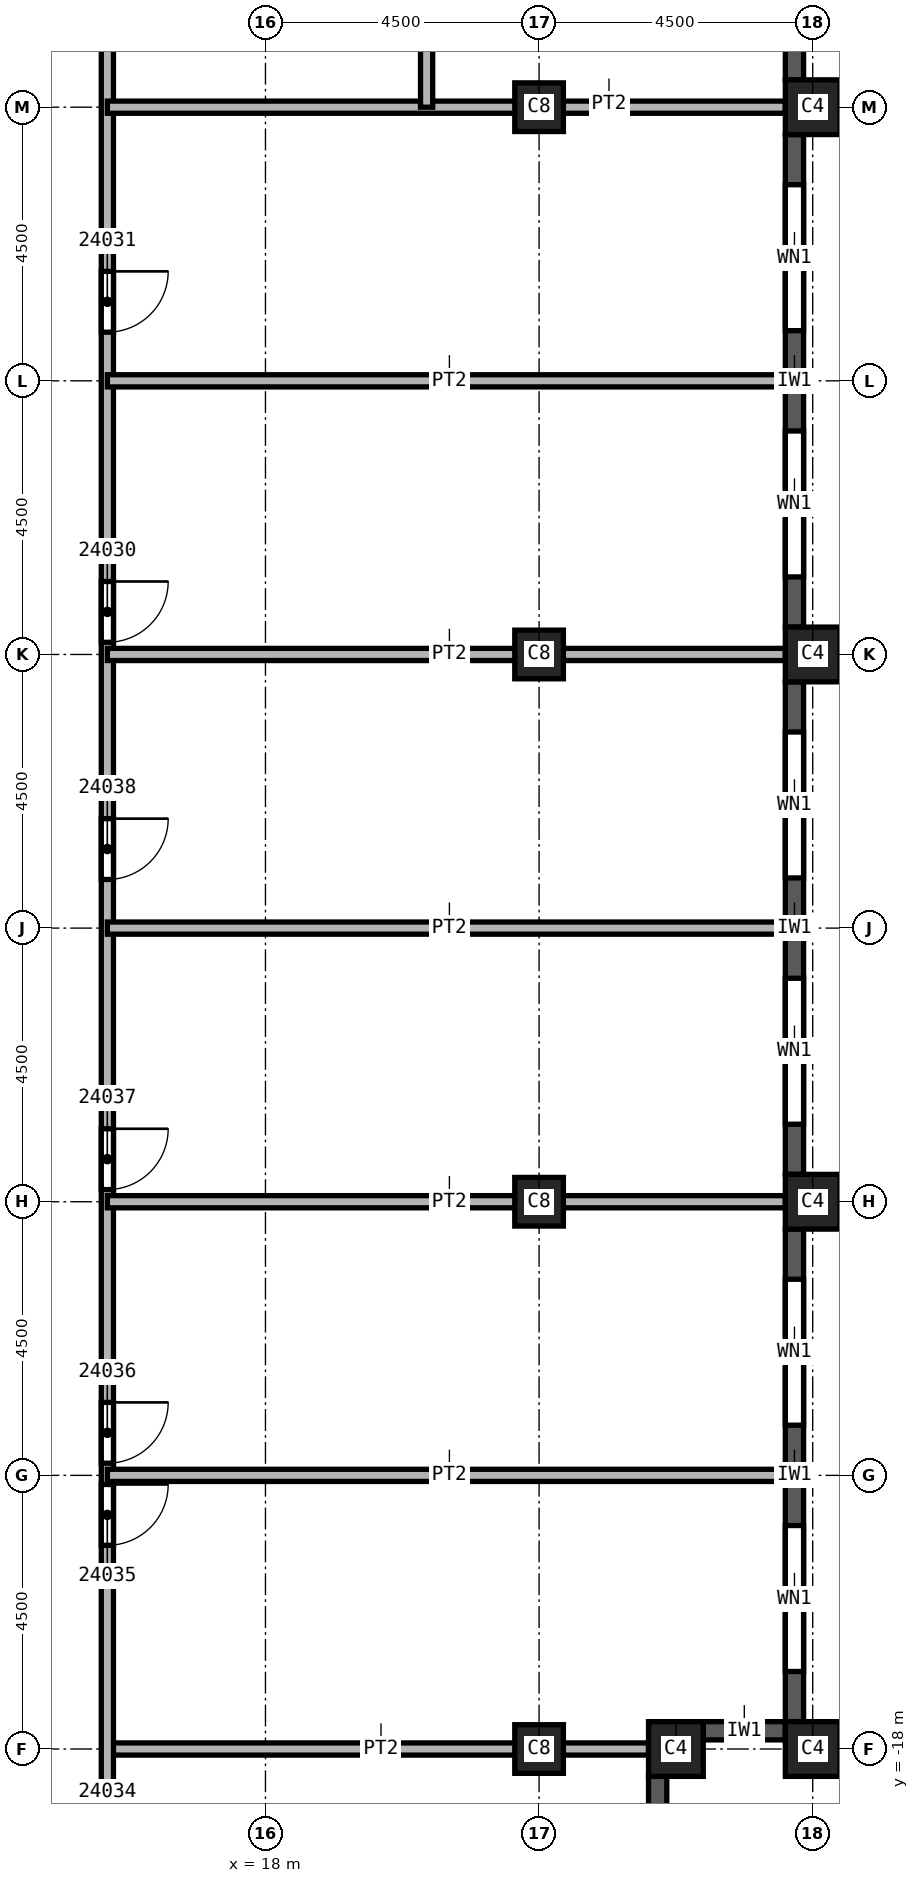
"""IFC4 building model, lengths in metres.
Left out: names, types, materials, properties, quantities, classifications, styles, units other than length and angle.
Written with IfcOpenShell. Run it as: python <this file> out.ifc"""

import sys

from ifc_helpers import new_model, si_unit, direction, frame, frame_2d, origin, origin_2d, place, context, subcontext, project, spatial, rectangle, extrude, element, fill, save


model = new_model("IFC4")
c1 = context("Model", 3, precision=1e-05, world=origin(), true_north=direction((0.0, 1.0)))
c2 = subcontext(c1, "Body", "Model", "MODEL_VIEW")
j1 = project(units=[si_unit("LENGTHUNIT", "METRE"), si_unit("PLANEANGLEUNIT", "RADIAN")], contexts=[c1])
p1 = place(None, origin())
s1 = spatial("IfcSite", under=j1, at=p1, CompositionType="ELEMENT")
p2 = place(p1, origin())
s2 = spatial("IfcBuilding", under=s1, at=p2, CompositionType="ELEMENT")
p3 = place(p2, frame((0.0, 0.0, 338.0)))
s3 = spatial("IfcBuildingStorey", under=s2, at=p3, CompositionType="ELEMENT", Elevation=338.0)
for number, where, z_axis, x_axis in (
    (1, (22.5, 0.0, 0.0), (0.0, 0.0, 1.0), (1.0, 0.0, 0.0)),
    (2, (22.5, 9.0, 0.0), (0.0, 0.0, 1.0), (1.0, 0.0, 0.0)),
    (3, (22.5, -9.0, 0.0), (0.0, 0.0, 1.0), (1.0, 0.0, 0.0)),
    (4, (22.5, -18.0, 0.0), (0.0, 0.0, 1.0), (1.0, 0.0, 0.0)),
):
    element("IfcColumn", number, at=place(p3, frame(where, z_axis=z_axis, x_axis=x_axis)), inside=s3, PredefinedType="COLUMN", context=c2, shape_type="SweptSolid", body=[
        extrude(rectangle(XDim=0.8, YDim=0.8, at=origin_2d()), origin(), (0.0, 0.0, 1.0), 3.74),
    ])
for number, where, z_axis, x_axis in (
    (5, (27.0, 0.0, 0.0), (0.0, 0.0, 1.0), (0.0, 1.0, 0.0)),
    (6, (27.0, 9.0, 0.0), (0.0, 0.0, 1.0), (0.0, 1.0, 0.0)),
    (7, (27.0, -9.0, 0.0), (0.0, 0.0, 1.0), (0.0, 1.0, 0.0)),
    (8, (27.0, -18.0, 0.0), (0.0, 0.0, 1.0), (0.0, 1.0, 0.0)),
    (9, (24.75, -18.0, 0.0), (0.0, 0.0, 1.0), (1.0, 0.0, 0.0)),
):
    element("IfcColumn", number, at=place(p3, frame(where, z_axis=z_axis, x_axis=x_axis)), inside=s3, PredefinedType="COLUMN", context=c2, shape_type="SweptSolid", body=[
        extrude(rectangle(XDim=0.9, YDim=0.9, at=origin_2d()), origin(), (0.0, 0.0, 1.0), 3.74),
    ])
p4 = place(p3, frame((24.45, -21.25, 0.0), z_axis=(0.0, 0.0, 1.0), x_axis=(0.0, 1.0, 0.0)))
e10 = element("IfcWall", 10, at=p4, inside=s3, PredefinedType="SOLIDWALL", context=c2, shape_type="SweptSolid", body=[
    extrude(rectangle(XDim=2.8, YDim=0.3, at=frame_2d((1.4, 0.0))), origin(), (0.0, 0.0, 1.0), 3.14),
])
p5 = place(p3, frame((25.2, -17.7, 0.0), z_axis=(0.0, 0.0, 1.0), x_axis=(1.0, 0.0, 0.0)))
e11 = element("IfcWall", 11, at=p5, inside=s3, PredefinedType="SOLIDWALL", context=c2, shape_type="SweptSolid", body=[
    extrude(rectangle(XDim=1.35, YDim=0.3, at=frame_2d((0.675, 0.0))), origin(), (0.0, 0.0, 1.0), 3.14),
])
p6 = place(p3, frame((26.7, -17.55, 0.0), z_axis=(0.0, 0.0, 1.0), x_axis=(0.0, 1.0, 0.0)))
e12 = element("IfcWall", 12, at=p6, inside=s3, PredefinedType="SOLIDWALL", context=c2, shape_type="SweptSolid", body=[
    extrude(rectangle(XDim=8.1, YDim=0.3, at=frame_2d((4.05, 0.0))), origin(), (0.0, 0.0, 1.0), 3.14),
])
p7 = place(p6, frame((0.825, 0.0, 0.8)))
e13 = element("IfcOpeningElement", 13, at=p7, cuts=e12, PredefinedType="OPENING", context=c2, shape_type="SweptSolid", body=[
    extrude(rectangle(XDim=2.4, YDim=1.95, at=frame_2d((1.2, 0.975))), frame((0.0, 0.15, 0.0), z_axis=(0.0, -1.0, 0.0), x_axis=(1.0, 0.0, 0.0)), (0.0, 0.0, 1.0), 0.3),
])
p8 = place(p6, frame((4.875, 0.0, 0.8)))
e14 = element("IfcOpeningElement", 14, at=p8, cuts=e12, PredefinedType="OPENING", context=c2, shape_type="SweptSolid", body=[
    extrude(rectangle(XDim=2.4, YDim=1.95, at=frame_2d((1.2, 0.975))), frame((0.0, 0.15, 0.0), z_axis=(0.0, -1.0, 0.0), x_axis=(1.0, 0.0, 0.0)), (0.0, 0.0, 1.0), 0.3),
])
p9 = place(p3, frame((26.7, -8.55, 0.0), z_axis=(0.0, 0.0, 1.0), x_axis=(0.0, 1.0, 0.0)))
e15 = element("IfcWall", 15, at=p9, inside=s3, PredefinedType="SOLIDWALL", context=c2, shape_type="SweptSolid", body=[
    extrude(rectangle(XDim=8.1, YDim=0.3, at=frame_2d((4.05, 0.0))), origin(), (0.0, 0.0, 1.0), 3.14),
])
p10 = place(p9, frame((0.825, 0.0, 0.8)))
e16 = element("IfcOpeningElement", 16, at=p10, cuts=e15, PredefinedType="OPENING", context=c2, shape_type="SweptSolid", body=[
    extrude(rectangle(XDim=2.4, YDim=1.95, at=frame_2d((1.2, 0.975))), frame((0.0, 0.15, 0.0), z_axis=(0.0, -1.0, 0.0), x_axis=(1.0, 0.0, 0.0)), (0.0, 0.0, 1.0), 0.3),
])
p11 = place(p9, frame((4.875, 0.0, 0.8)))
e17 = element("IfcOpeningElement", 17, at=p11, cuts=e15, PredefinedType="OPENING", context=c2, shape_type="SweptSolid", body=[
    extrude(rectangle(XDim=2.4, YDim=1.95, at=frame_2d((1.2, 0.975))), frame((0.0, 0.15, 0.0), z_axis=(0.0, -1.0, 0.0), x_axis=(1.0, 0.0, 0.0)), (0.0, 0.0, 1.0), 0.3),
])
p12 = place(p3, frame((26.7, 0.45, 0.0), z_axis=(0.0, 0.0, 1.0), x_axis=(0.0, 1.0, 0.0)))
e18 = element("IfcWall", 18, at=p12, inside=s3, PredefinedType="SOLIDWALL", context=c2, shape_type="SweptSolid", body=[
    extrude(rectangle(XDim=8.1, YDim=0.3, at=frame_2d((4.05, 0.0))), origin(), (0.0, 0.0, 1.0), 3.14),
])
p13 = place(p12, frame((0.825, 0.0, 0.8)))
e19 = element("IfcOpeningElement", 19, at=p13, cuts=e18, PredefinedType="OPENING", context=c2, shape_type="SweptSolid", body=[
    extrude(rectangle(XDim=2.4, YDim=1.95, at=frame_2d((1.2, 0.975))), frame((0.0, 0.15, 0.0), z_axis=(0.0, -1.0, 0.0), x_axis=(1.0, 0.0, 0.0)), (0.0, 0.0, 1.0), 0.3),
])
p14 = place(p12, frame((4.875, 0.0, 0.8)))
e20 = element("IfcOpeningElement", 20, at=p14, cuts=e18, PredefinedType="OPENING", context=c2, shape_type="SweptSolid", body=[
    extrude(rectangle(XDim=2.4, YDim=1.95, at=frame_2d((1.2, 0.975))), frame((0.0, 0.15, 0.0), z_axis=(0.0, -1.0, 0.0), x_axis=(1.0, 0.0, 0.0)), (0.0, 0.0, 1.0), 0.3),
])
p15 = place(p3, frame((26.7, 9.45, 0.0), z_axis=(0.0, 0.0, 1.0), x_axis=(0.0, 1.0, 0.0)))
e21 = element("IfcWall", 21, at=p15, inside=s3, PredefinedType="SOLIDWALL", context=c2, shape_type="SweptSolid", body=[
    extrude(rectangle(XDim=8.1, YDim=0.3, at=frame_2d((4.05, 0.0))), origin(), (0.0, 0.0, 1.0), 3.14),
])
p16 = place(p15, frame((0.825, 0.0, 0.8)))
e22 = element("IfcOpeningElement", 22, at=p16, cuts=e21, PredefinedType="OPENING", context=c2, shape_type="SweptSolid", body=[
    extrude(rectangle(XDim=2.4, YDim=1.95, at=frame_2d((1.2, 0.975))), frame((0.0, 0.15, 0.0), z_axis=(0.0, -1.0, 0.0), x_axis=(1.0, 0.0, 0.0)), (0.0, 0.0, 1.0), 0.3),
])
p17 = place(p15, frame((4.875, 0.0, 0.8)))
e23 = element("IfcOpeningElement", 23, at=p17, cuts=e21, PredefinedType="OPENING", context=c2, shape_type="SweptSolid", body=[
    extrude(rectangle(XDim=2.4, YDim=1.95, at=frame_2d((1.2, 0.975))), frame((0.0, 0.15, 0.0), z_axis=(0.0, -1.0, 0.0), x_axis=(1.0, 0.0, 0.0)), (0.0, 0.0, 1.0), 0.3),
])
p18 = place(p3, frame((15.4, -18.0, 0.0), z_axis=(0.0, 0.0, 1.0), x_axis=(1.0, 0.0, 0.0)))
e24 = element("IfcWall", 24, at=p18, inside=s3, PredefinedType="PARTITIONING", context=c2, shape_type="SweptSolid", body=[
    extrude(rectangle(XDim=8.9, YDim=0.2, at=frame_2d((4.45, 0.0))), origin(), (0.0, 0.0, 1.0), 3.74),
])
p19 = place(p3, frame((15.4, 24.95, 0.0), z_axis=(0.0, 0.0, 1.0), x_axis=(0.0, -1.0, 0.0)))
e25 = element("IfcWall", 25, at=p19, inside=s3, PredefinedType="PARTITIONING", context=c2, shape_type="SweptSolid", body=[
    extrude(rectangle(XDim=49.9, YDim=0.2, at=frame_2d((24.95, 0.0))), origin(), (0.0, 0.0, 1.0), 3.74),
])
p20 = place(p19, frame((23.75, 0.0, 0.0)))
e26 = element("IfcOpeningElement", 26, at=p20, cuts=e25, PredefinedType="OPENING", context=c2, shape_type="SweptSolid", body=[
    extrude(rectangle(XDim=1.0, YDim=2.1, at=frame_2d((0.5, 1.05))), frame((0.0, 0.1, 0.0), z_axis=(0.0, -1.0, 0.0), x_axis=(1.0, 0.0, 0.0)), (0.0, 0.0, 1.0), 0.2),
])
p21 = place(p19, frame((18.65, 0.0, 0.0)))
e27 = element("IfcOpeningElement", 27, at=p21, cuts=e25, PredefinedType="OPENING", context=c2, shape_type="SweptSolid", body=[
    extrude(rectangle(XDim=1.0, YDim=2.1, at=frame_2d((0.5, 1.05))), frame((0.0, 0.1, 0.0), z_axis=(0.0, -1.0, 0.0), x_axis=(1.0, 0.0, 0.0)), (0.0, 0.0, 1.0), 0.2),
])
p22 = place(p19, frame((7.45, 0.0, 0.0)))
e28 = element("IfcOpeningElement", 28, at=p22, cuts=e25, PredefinedType="OPENING", context=c2, shape_type="SweptSolid", body=[
    extrude(rectangle(XDim=1.0, YDim=2.1, at=frame_2d((0.5, 1.05))), frame((0.0, 0.1, 0.0), z_axis=(0.0, -1.0, 0.0), x_axis=(1.0, 0.0, 0.0)), (0.0, 0.0, 1.0), 0.2),
])
p23 = place(p19, frame((44.15, 0.0, 0.0)))
e29 = element("IfcOpeningElement", 29, at=p23, cuts=e25, PredefinedType="OPENING", context=c2, shape_type="SweptSolid", body=[
    extrude(rectangle(XDim=1.0, YDim=2.1, at=frame_2d((0.5, 1.05))), frame((0.0, 0.1, 0.0), z_axis=(0.0, -1.0, 0.0), x_axis=(1.0, 0.0, 0.0)), (0.0, 0.0, 1.0), 0.2),
])
p24 = place(p19, frame((38.6, 0.0, 0.0)))
e30 = element("IfcOpeningElement", 30, at=p24, cuts=e25, PredefinedType="OPENING", context=c2, shape_type="SweptSolid", body=[
    extrude(rectangle(XDim=1.0, YDim=2.1, at=frame_2d((0.5, 1.05))), frame((0.0, 0.1, 0.0), z_axis=(0.0, -1.0, 0.0), x_axis=(1.0, 0.0, 0.0)), (0.0, 0.0, 1.0), 0.2),
])
p25 = place(p19, frame((37.25, 0.0, 0.0)))
e31 = element("IfcOpeningElement", 31, at=p25, cuts=e25, PredefinedType="OPENING", context=c2, shape_type="SweptSolid", body=[
    extrude(rectangle(XDim=1.0, YDim=2.1, at=frame_2d((0.5, 1.05))), frame((0.0, 0.1, 0.0), z_axis=(0.0, -1.0, 0.0), x_axis=(1.0, 0.0, 0.0)), (0.0, 0.0, 1.0), 0.2),
])
p26 = place(p19, frame((32.75, 0.0, 0.0)))
e32 = element("IfcOpeningElement", 32, at=p26, cuts=e25, PredefinedType="OPENING", context=c2, shape_type="SweptSolid", body=[
    extrude(rectangle(XDim=1.0, YDim=2.1, at=frame_2d((0.5, 1.05))), frame((0.0, 0.1, 0.0), z_axis=(0.0, -1.0, 0.0), x_axis=(1.0, 0.0, 0.0)), (0.0, 0.0, 1.0), 0.2),
])
p27 = place(p19, frame((27.65, 0.0, 0.0)))
e33 = element("IfcOpeningElement", 33, at=p27, cuts=e25, PredefinedType="OPENING", context=c2, shape_type="SweptSolid", body=[
    extrude(rectangle(XDim=1.0, YDim=2.1, at=frame_2d((0.5, 1.05))), frame((0.0, 0.1, 0.0), z_axis=(0.0, -1.0, 0.0), x_axis=(1.0, 0.0, 0.0)), (0.0, 0.0, 1.0), 0.2),
])
for number, where, z_axis, x_axis in (
    (34, (15.4, -13.5, 0.0), (0.0, 0.0, 1.0), (1.0, 0.0, 0.0)),
    (35, (15.4, -9.0, 0.0), (0.0, 0.0, 1.0), (1.0, 0.0, 0.0)),
    (36, (15.4, -4.5, 0.0), (0.0, 0.0, 1.0), (1.0, 0.0, 0.0)),
    (37, (15.4, 4.5, 0.0), (0.0, 0.0, 1.0), (1.0, 0.0, 0.0)),
    (38, (15.4, 9.0, 0.0), (0.0, 0.0, 1.0), (1.0, 0.0, 0.0)),
):
    element("IfcWall", number, at=place(p3, frame(where, z_axis=z_axis, x_axis=x_axis)), inside=s3, PredefinedType="PARTITIONING", context=c2, shape_type="SweptSolid", body=[
        extrude(rectangle(XDim=11.15, YDim=0.2, at=frame_2d((5.575, 0.0))), origin(), (0.0, 0.0, 1.0), 3.74),
    ])
p28 = place(p3, frame((20.65, 24.95, 0.0), z_axis=(0.0, 0.0, 1.0), x_axis=(0.0, -1.0, 0.0)))
e39 = element("IfcWall", 39, at=p28, inside=s3, PredefinedType="PARTITIONING", context=c2, shape_type="SweptSolid", body=[
    extrude(rectangle(XDim=15.95, YDim=0.2, at=frame_2d((7.975, 0.0))), origin(), (0.0, 0.0, 1.0), 3.74),
])
p29 = place(p28, frame((7.75, 0.0, 0.0)))
e40 = element("IfcOpeningElement", 40, at=p29, cuts=e39, PredefinedType="OPENING", context=c2, shape_type="SweptSolid", body=[
    extrude(rectangle(XDim=1.0, YDim=2.1, at=frame_2d((0.5, 1.05))), frame((0.0, 0.1, 0.0), z_axis=(0.0, -1.0, 0.0), x_axis=(1.0, 0.0, 0.0)), (0.0, 0.0, 1.0), 0.2),
])
p30 = place(p3, frame((26.55, 0.0, 0.0), z_axis=(0.0, 0.0, 1.0), x_axis=(-1.0, 0.0, 0.0)))
e41 = element("IfcWall", 41, at=p30, inside=s3, PredefinedType="PARTITIONING", context=c2, shape_type="SweptSolid", body=[
    extrude(rectangle(XDim=11.15, YDim=0.2, at=frame_2d((5.575, 0.0))), origin(), (0.0, 0.0, 1.0), 3.74),
])
p31 = place(p7, origin())
e42 = element("IfcWindow", 42, at=p31, inside=s3, PartitioningType="SINGLE_PANEL", PredefinedType="WINDOW", context=c2, shape_type="SweptSolid", body=[
    extrude(rectangle(XDim=2.4, YDim=1.95, at=frame_2d((1.2, 0.975))), frame((0.0, 0.03, 0.0), z_axis=(0.0, -1.0, 0.0), x_axis=(1.0, 0.0, 0.0)), (0.0, 0.0, 1.0), 0.06),
])
fill(e13, e42)
p32 = place(p8, origin())
e43 = element("IfcWindow", 43, at=p32, inside=s3, PartitioningType="SINGLE_PANEL", PredefinedType="WINDOW", context=c2, shape_type="SweptSolid", body=[
    extrude(rectangle(XDim=2.4, YDim=1.95, at=frame_2d((1.2, 0.975))), frame((0.0, 0.03, 0.0), z_axis=(0.0, -1.0, 0.0), x_axis=(1.0, 0.0, 0.0)), (0.0, 0.0, 1.0), 0.06),
])
fill(e14, e43)
p33 = place(p10, origin())
e44 = element("IfcWindow", 44, at=p33, inside=s3, PartitioningType="SINGLE_PANEL", PredefinedType="WINDOW", context=c2, shape_type="SweptSolid", body=[
    extrude(rectangle(XDim=2.4, YDim=1.95, at=frame_2d((1.2, 0.975))), frame((0.0, 0.03, 0.0), z_axis=(0.0, -1.0, 0.0), x_axis=(1.0, 0.0, 0.0)), (0.0, 0.0, 1.0), 0.06),
])
fill(e16, e44)
p34 = place(p11, origin())
e45 = element("IfcWindow", 45, at=p34, inside=s3, PartitioningType="SINGLE_PANEL", PredefinedType="WINDOW", context=c2, shape_type="SweptSolid", body=[
    extrude(rectangle(XDim=2.4, YDim=1.95, at=frame_2d((1.2, 0.975))), frame((0.0, 0.03, 0.0), z_axis=(0.0, -1.0, 0.0), x_axis=(1.0, 0.0, 0.0)), (0.0, 0.0, 1.0), 0.06),
])
fill(e17, e45)
p35 = place(p13, origin())
e46 = element("IfcWindow", 46, at=p35, inside=s3, PartitioningType="SINGLE_PANEL", PredefinedType="WINDOW", context=c2, shape_type="SweptSolid", body=[
    extrude(rectangle(XDim=2.4, YDim=1.95, at=frame_2d((1.2, 0.975))), frame((0.0, 0.03, 0.0), z_axis=(0.0, -1.0, 0.0), x_axis=(1.0, 0.0, 0.0)), (0.0, 0.0, 1.0), 0.06),
])
fill(e19, e46)
p36 = place(p14, origin())
e47 = element("IfcWindow", 47, at=p36, inside=s3, PartitioningType="SINGLE_PANEL", PredefinedType="WINDOW", context=c2, shape_type="SweptSolid", body=[
    extrude(rectangle(XDim=2.4, YDim=1.95, at=frame_2d((1.2, 0.975))), frame((0.0, 0.03, 0.0), z_axis=(0.0, -1.0, 0.0), x_axis=(1.0, 0.0, 0.0)), (0.0, 0.0, 1.0), 0.06),
])
fill(e20, e47)
p37 = place(p20, origin())
e48 = element("IfcDoor", 48, at=p37, inside=s3, OperationType="SINGLE_SWING_LEFT", PredefinedType="DOOR", context=c2, shape_type="SweptSolid", body=[
    extrude(rectangle(XDim=1.0, YDim=2.1, at=frame_2d((0.5, 1.05))), frame((0.0, 0.025, 0.0), z_axis=(0.0, -1.0, 0.0), x_axis=(1.0, 0.0, 0.0)), (0.0, 0.0, 1.0), 0.05),
])
fill(e26, e48)
p38 = place(p21, origin())
e49 = element("IfcDoor", 49, at=p38, inside=s3, OperationType="SINGLE_SWING_RIGHT", PredefinedType="DOOR", context=c2, shape_type="SweptSolid", body=[
    extrude(rectangle(XDim=1.0, YDim=2.1, at=frame_2d((0.5, 1.05))), frame((0.0, 0.025, 0.0), z_axis=(0.0, -1.0, 0.0), x_axis=(1.0, 0.0, 0.0)), (0.0, 0.0, 1.0), 0.05),
])
fill(e27, e49)
p39 = place(p24, origin())
e50 = element("IfcDoor", 50, at=p39, inside=s3, OperationType="SINGLE_SWING_RIGHT", PredefinedType="DOOR", context=c2, shape_type="SweptSolid", body=[
    extrude(rectangle(XDim=1.0, YDim=2.1, at=frame_2d((0.5, 1.05))), frame((0.0, 0.025, 0.0), z_axis=(0.0, -1.0, 0.0), x_axis=(1.0, 0.0, 0.0)), (0.0, 0.0, 1.0), 0.05),
])
fill(e30, e50)
p40 = place(p25, origin())
e51 = element("IfcDoor", 51, at=p40, inside=s3, OperationType="SINGLE_SWING_LEFT", PredefinedType="DOOR", context=c2, shape_type="SweptSolid", body=[
    extrude(rectangle(XDim=1.0, YDim=2.1, at=frame_2d((0.5, 1.05))), frame((0.0, 0.025, 0.0), z_axis=(0.0, -1.0, 0.0), x_axis=(1.0, 0.0, 0.0)), (0.0, 0.0, 1.0), 0.05),
])
fill(e31, e51)
p41 = place(p26, origin())
e52 = element("IfcDoor", 52, at=p41, inside=s3, OperationType="SINGLE_SWING_RIGHT", PredefinedType="DOOR", context=c2, shape_type="SweptSolid", body=[
    extrude(rectangle(XDim=1.0, YDim=2.1, at=frame_2d((0.5, 1.05))), frame((0.0, 0.025, 0.0), z_axis=(0.0, -1.0, 0.0), x_axis=(1.0, 0.0, 0.0)), (0.0, 0.0, 1.0), 0.05),
])
fill(e32, e52)
p42 = place(p27, origin())
e53 = element("IfcDoor", 53, at=p42, inside=s3, OperationType="SINGLE_SWING_LEFT", PredefinedType="DOOR", context=c2, shape_type="SweptSolid", body=[
    extrude(rectangle(XDim=1.0, YDim=2.1, at=frame_2d((0.5, 1.05))), frame((0.0, 0.025, 0.0), z_axis=(0.0, -1.0, 0.0), x_axis=(1.0, 0.0, 0.0)), (0.0, 0.0, 1.0), 0.05),
])
fill(e33, e53)
save(model, sys.argv[1])
